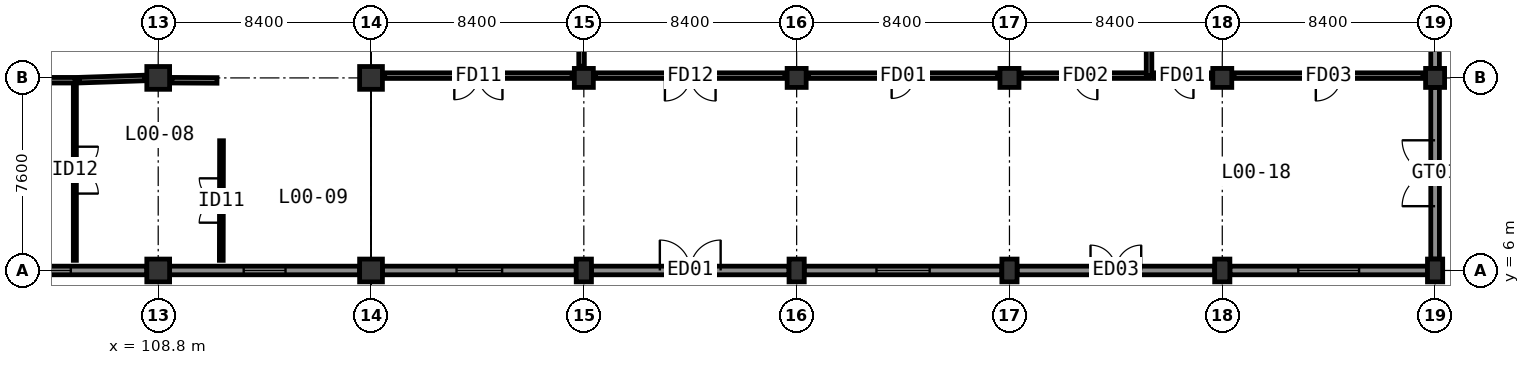
"""IFC4 building model, lengths in metres.
Left out: names, types, materials, properties, quantities, classifications, styles, units other than length and angle.
Written with IfcOpenShell. Run it as: python <this file> out.ifc"""

import sys

from ifc_helpers import new_model, si_unit, direction, frame, frame_2d, origin, origin_2d, place, context, subcontext, project, spatial, rectangle, extrude, element, fill, save


model = new_model("IFC4")
c1 = context("Model", 3, precision=1e-05, world=origin(), true_north=direction((0.0, 1.0)))
c2 = subcontext(c1, "Body", "Model", "MODEL_VIEW")
j1 = project(units=[si_unit("LENGTHUNIT", "METRE"), si_unit("PLANEANGLEUNIT", "RADIAN")], contexts=[c1])
p1 = place(None, origin())
s1 = spatial("IfcSite", under=j1, at=p1, CompositionType="ELEMENT")
p2 = place(p1, origin())
s2 = spatial("IfcBuilding", under=s1, at=p2, CompositionType="ELEMENT")
p3 = place(p2, origin())
s3 = spatial("IfcBuildingStorey", under=s2, at=p3, CompositionType="ELEMENT", Elevation=0.0)
for number, where, z_axis, x_axis in (
    (1, (108.8, 6.0, 0.0), (0.0, 0.0, 1.0), (1.0, 0.0, 0.0)),
    (2, (117.2, 6.0, 0.0), (0.0, 0.0, 1.0), (1.0, 0.0, 0.0)),
):
    element("IfcColumn", number, at=place(p3, frame(where, z_axis=z_axis, x_axis=x_axis)), inside=s3, PredefinedType="COLUMN", context=c2, shape_type="SweptSolid", body=[
        extrude(rectangle(XDim=0.9, YDim=0.9, at=origin_2d()), origin(), (0.0, 0.0, 1.0), 4.8),
    ])
for number, where, z_axis, x_axis in (
    (3, (125.6, 6.0, 0.0), (0.0, 0.0, 1.0), (1.0, 0.0, 0.0)),
    (4, (134.0, 6.0, 0.0), (0.0, 0.0, 1.0), (1.0, 0.0, 0.0)),
    (5, (142.4, 6.0, 0.0), (0.0, 0.0, 1.0), (1.0, 0.0, 0.0)),
    (6, (150.8, 6.0, 0.0), (0.0, 0.0, 1.0), (1.0, 0.0, 0.0)),
    (7, (159.2, 6.0, 0.0), (0.0, 0.0, 1.0), (1.0, 0.0, 0.0)),
):
    element("IfcColumn", number, at=place(p3, frame(where, z_axis=z_axis, x_axis=x_axis)), inside=s3, PredefinedType="PILASTER", context=c2, shape_type="SweptSolid", body=[
        extrude(rectangle(XDim=0.6, YDim=0.9, at=origin_2d()), origin(), (0.0, 0.0, 1.0), 4.8),
    ])
for number, where, z_axis, x_axis in (
    (8, (108.8, 13.6, 0.0), (0.0, 0.0, 1.0), (1.0, 0.0, 0.0)),
    (9, (117.2, 13.6, 0.0), (0.0, 0.0, 1.0), (1.0, 0.0, 0.0)),
):
    element("IfcColumn", number, at=place(p3, frame(where, z_axis=z_axis, x_axis=x_axis)), inside=s3, PredefinedType="COLUMN", context=c2, shape_type="SweptSolid", body=[
        extrude(rectangle(XDim=0.9, YDim=0.9, at=origin_2d()), origin(), (0.0, 0.0, 1.0), 4.8),
    ])
for number, where, z_axis, x_axis in (
    (10, (125.6, 13.6, 0.0), (0.0, 0.0, 1.0), (1.0, 0.0, 0.0)),
    (11, (134.0, 13.6, 0.0), (0.0, 0.0, 1.0), (1.0, 0.0, 0.0)),
    (12, (142.4, 13.6, 0.0), (0.0, 0.0, 1.0), (1.0, 0.0, 0.0)),
    (13, (150.8, 13.6, 0.0), (0.0, 0.0, 1.0), (1.0, 0.0, 0.0)),
    (14, (159.2, 13.6, 0.0), (0.0, 0.0, 1.0), (1.0, 0.0, 0.0)),
):
    element("IfcColumn", number, at=place(p3, frame(where, z_axis=z_axis, x_axis=x_axis)), inside=s3, PredefinedType="COLUMN", context=c2, shape_type="SweptSolid", body=[
        extrude(rectangle(XDim=0.75, YDim=0.75, at=origin_2d()), origin(), (0.0, 0.0, 1.0), 4.8),
    ])
p4 = place(p3, frame((100.85, 6.0, 0.0), z_axis=(0.0, 0.0, 1.0), x_axis=(1.0, 0.0, 0.0)))
e15 = element("IfcWall", 15, at=p4, inside=s3, PredefinedType="SOLIDWALL", context=c2, shape_type="SweptSolid", body=[
    extrude(rectangle(XDim=7.5, YDim=0.34, at=frame_2d((3.75, 0.0))), origin(), (0.0, 0.0, 1.0), 4.047),
])
p5 = place(p4, frame((3.0, 0.0, 0.95)))
e16 = element("IfcOpeningElement", 16, at=p5, cuts=e15, PredefinedType="OPENING", context=c2, shape_type="SweptSolid", body=[
    extrude(rectangle(XDim=1.5, YDim=1.5, at=frame_2d((0.75, 0.75))), frame((0.0, 0.18, 0.0), z_axis=(0.0, -1.0, 0.0), x_axis=(1.0, 0.0, 0.0)), (0.0, 0.0, 1.0), 0.36),
])
p6 = place(p3, frame((109.25, 6.0, 0.0), z_axis=(0.0, 0.0, 1.0), x_axis=(1.0, 0.0, 0.0)))
e17 = element("IfcWall", 17, at=p6, inside=s3, PredefinedType="SOLIDWALL", context=c2, shape_type="SweptSolid", body=[
    extrude(rectangle(XDim=7.5, YDim=0.34, at=frame_2d((3.75, 0.0))), origin(), (0.0, 0.0, 1.0), 4.047),
])
p7 = place(p6, frame((2.925, 0.0, 0.95)))
e18 = element("IfcOpeningElement", 18, at=p7, cuts=e17, PredefinedType="OPENING", context=c2, shape_type="SweptSolid", body=[
    extrude(rectangle(XDim=1.65, YDim=1.5, at=frame_2d((0.825, 0.75))), frame((0.0, 0.18, 0.0), z_axis=(0.0, -1.0, 0.0), x_axis=(1.0, 0.0, 0.0)), (0.0, 0.0, 1.0), 0.36),
])
p8 = place(p3, frame((117.65, 6.0, 0.0), z_axis=(0.0, 0.0, 1.0), x_axis=(1.0, 0.0, 0.0)))
e19 = element("IfcWall", 19, at=p8, inside=s3, PredefinedType="SOLIDWALL", context=c2, shape_type="SweptSolid", body=[
    extrude(rectangle(XDim=7.65, YDim=0.34, at=frame_2d((3.825, 0.0))), origin(), (0.0, 0.0, 1.0), 4.047),
])
p9 = place(p8, frame((2.925, 0.0, 0.95)))
e20 = element("IfcOpeningElement", 20, at=p9, cuts=e19, PredefinedType="OPENING", context=c2, shape_type="SweptSolid", body=[
    extrude(rectangle(XDim=1.8, YDim=1.5, at=frame_2d((0.9, 0.75))), frame((0.0, 0.18, 0.0), z_axis=(0.0, -1.0, 0.0), x_axis=(1.0, 0.0, 0.0)), (0.0, 0.0, 1.0), 0.36),
])
p10 = place(p3, frame((125.9, 6.0, 0.0), z_axis=(0.0, 0.0, 1.0), x_axis=(1.0, 0.0, 0.0)))
e21 = element("IfcWall", 21, at=p10, inside=s3, PredefinedType="SOLIDWALL", context=c2, shape_type="SweptSolid", body=[
    extrude(rectangle(XDim=7.8, YDim=0.34, at=frame_2d((3.9, 0.0))), origin(), (0.0, 0.0, 1.0), 4.187),
])
p11 = place(p10, frame((2.7, 0.0, 0.0)))
e22 = element("IfcOpeningElement", 22, at=p11, cuts=e21, PredefinedType="OPENING", context=c2, shape_type="SweptSolid", body=[
    extrude(rectangle(XDim=2.4, YDim=2.4, at=frame_2d((1.2, 1.2))), frame((0.0, 0.18, 0.0), z_axis=(0.0, -1.0, 0.0), x_axis=(1.0, 0.0, 0.0)), (0.0, 0.0, 1.0), 0.36),
])
p12 = place(p3, frame((134.3, 6.0, 0.0), z_axis=(0.0, 0.0, 1.0), x_axis=(1.0, 0.0, 0.0)))
e23 = element("IfcWall", 23, at=p12, inside=s3, PredefinedType="SOLIDWALL", context=c2, shape_type="SweptSolid", body=[
    extrude(rectangle(XDim=7.8, YDim=0.34, at=frame_2d((3.9, 0.0))), origin(), (0.0, 0.0, 1.0), 4.187),
])
p13 = place(p12, frame((2.85, 0.0, 0.95)))
e24 = element("IfcOpeningElement", 24, at=p13, cuts=e23, PredefinedType="OPENING", context=c2, shape_type="SweptSolid", body=[
    extrude(rectangle(XDim=2.1, YDim=1.5, at=frame_2d((1.05, 0.75))), frame((0.0, 0.18, 0.0), z_axis=(0.0, -1.0, 0.0), x_axis=(1.0, 0.0, 0.0)), (0.0, 0.0, 1.0), 0.36),
])
p14 = place(p3, frame((142.7, 6.0, 0.0), z_axis=(0.0, 0.0, 1.0), x_axis=(1.0, 0.0, 0.0)))
e25 = element("IfcWall", 25, at=p14, inside=s3, PredefinedType="SOLIDWALL", context=c2, shape_type="SweptSolid", body=[
    extrude(rectangle(XDim=7.8, YDim=0.34, at=frame_2d((3.9, 0.0))), origin(), (0.0, 0.0, 1.0), 4.187),
])
p15 = place(p14, frame((2.9, 0.0, 0.0)))
e26 = element("IfcOpeningElement", 26, at=p15, cuts=e25, PredefinedType="OPENING", context=c2, shape_type="SweptSolid", body=[
    extrude(rectangle(XDim=2.0, YDim=2.2, at=frame_2d((1.0, 1.1))), frame((0.0, 0.18, 0.0), z_axis=(0.0, -1.0, 0.0), x_axis=(1.0, 0.0, 0.0)), (0.0, 0.0, 1.0), 0.36),
])
p16 = place(p3, frame((151.1, 6.0, 0.0), z_axis=(0.0, 0.0, 1.0), x_axis=(1.0, 0.0, 0.0)))
e27 = element("IfcWall", 27, at=p16, inside=s3, PredefinedType="SOLIDWALL", context=c2, shape_type="SweptSolid", body=[
    extrude(rectangle(XDim=7.8, YDim=0.34, at=frame_2d((3.9, 0.0))), origin(), (0.0, 0.0, 1.0), 4.187),
])
p17 = place(p16, frame((2.7, 0.0, 0.95)))
e28 = element("IfcOpeningElement", 28, at=p17, cuts=e27, PredefinedType="OPENING", context=c2, shape_type="SweptSolid", body=[
    extrude(rectangle(XDim=2.4, YDim=1.5, at=frame_2d((1.2, 0.75))), frame((0.0, 0.18, 0.0), z_axis=(0.0, -1.0, 0.0), x_axis=(1.0, 0.0, 0.0)), (0.0, 0.0, 1.0), 0.36),
])
p18 = place(p3, frame((159.2, 6.45, 0.0), z_axis=(0.0, 0.0, 1.0), x_axis=(0.0, 1.0, 0.0)))
e29 = element("IfcWall", 29, at=p18, inside=s3, PredefinedType="SOLIDWALL", context=c2, shape_type="SweptSolid", body=[
    extrude(rectangle(XDim=6.775, YDim=0.34, at=frame_2d((3.388, 0.0))), origin(), (0.0, 0.0, 1.0), 4.237),
])
p19 = place(p18, frame((2.087, 0.0, 0.0)))
e30 = element("IfcOpeningElement", 30, at=p19, cuts=e29, PredefinedType="OPENING", context=c2, shape_type="SweptSolid", body=[
    extrude(rectangle(XDim=2.6, YDim=2.2, at=frame_2d((1.3, 1.1))), frame((0.0, 0.18, 0.0), z_axis=(0.0, -1.0, 0.0), x_axis=(1.0, 0.0, 0.0)), (0.0, 0.0, 1.0), 0.36),
])
p20 = place(p3, frame((159.2, 13.975, 0.0), z_axis=(0.0, 0.0, 1.0), x_axis=(0.0, 1.0, 0.0)))
e31 = element("IfcWall", 31, at=p20, inside=s3, PredefinedType="SOLIDWALL", context=c2, shape_type="SweptSolid", body=[
    extrude(rectangle(XDim=6.85, YDim=0.34, at=frame_2d((3.425, 0.0))), origin(), (0.0, 0.0, 1.0), 4.237),
])
p21 = place(p3, frame((125.51, 20.735, 0.0), z_axis=(0.0, 0.0, 1.0), x_axis=(0.0, -1.0, 0.0)))
e32 = element("IfcWall", 32, at=p21, inside=s3, PredefinedType="SOLIDWALL", context=c2, shape_type="SweptSolid", body=[
    extrude(rectangle(XDim=6.67, YDim=0.22, at=frame_2d((3.335, 0.0))), origin(), (0.0, 0.0, 1.0), 3.95),
])
p22 = place(p21, frame((2.86, 0.0, 0.0)))
e33 = element("IfcOpeningElement", 33, at=p22, cuts=e32, PredefinedType="OPENING", context=c2, shape_type="SweptSolid", body=[
    extrude(rectangle(XDim=0.95, YDim=2.1, at=frame_2d((0.475, 1.05))), frame((0.0, 0.12, 0.0), z_axis=(0.0, -1.0, 0.0), x_axis=(1.0, 0.0, 0.0)), (0.0, 0.0, 1.0), 0.24),
])
p23 = place(p3, frame((133.535, 13.69, 0.0), z_axis=(0.0, 0.0, 1.0), x_axis=(-1.0, 0.0, 0.0)))
e34 = element("IfcWall", 34, at=p23, inside=s3, PredefinedType="SOLIDWALL", context=c2, shape_type="SweptSolid", body=[
    extrude(rectangle(XDim=7.47, YDim=0.22, at=frame_2d((3.735, 0.0))), origin(), (0.0, 0.0, 1.0), 4.187),
])
p24 = place(p23, frame((2.735, 0.0, 0.0)))
e35 = element("IfcOpeningElement", 35, at=p24, cuts=e34, PredefinedType="OPENING", context=c2, shape_type="SweptSolid", body=[
    extrude(rectangle(XDim=2.0, YDim=2.25, at=frame_2d((1.0, 1.125))), frame((0.0, 0.12, 0.0), z_axis=(0.0, -1.0, 0.0), x_axis=(1.0, 0.0, 0.0)), (0.0, 0.0, 1.0), 0.24),
])
p25 = place(p3, frame((141.935, 13.69, 0.0), z_axis=(0.0, 0.0, 1.0), x_axis=(-1.0, 0.0, 0.0)))
e36 = element("IfcWall", 36, at=p25, inside=s3, PredefinedType="SOLIDWALL", context=c2, shape_type="SweptSolid", body=[
    extrude(rectangle(XDim=7.47, YDim=0.22, at=frame_2d((3.735, 0.0))), origin(), (0.0, 0.0, 1.0), 4.187),
])
p26 = place(p25, frame((3.285, 0.0, 0.0)))
e37 = element("IfcOpeningElement", 37, at=p26, cuts=e36, PredefinedType="OPENING", context=c2, shape_type="SweptSolid", body=[
    extrude(rectangle(XDim=0.9, YDim=2.1, at=frame_2d((0.45, 1.05))), frame((0.0, 0.12, 0.0), z_axis=(0.0, -1.0, 0.0), x_axis=(1.0, 0.0, 0.0)), (0.0, 0.0, 1.0), 0.24),
])
p27 = place(p3, frame((147.92, 13.691, 0.0), z_axis=(0.0, 0.0, 1.0), x_axis=(-0.999999970842, -0.000241487556, 0.0)))
e38 = element("IfcWall", 38, at=p27, inside=s3, PredefinedType="SOLIDWALL", context=c2, shape_type="SweptSolid", body=[
    extrude(rectangle(XDim=5.055, YDim=0.22, at=frame_2d((2.527, 0.0))), origin(), (0.0, 0.0, 1.0), 4.187),
])
p28 = place(p27, frame((2.052, 0.0, 0.0)))
e39 = element("IfcOpeningElement", 39, at=p28, cuts=e38, PredefinedType="OPENING", context=c2, shape_type="SweptSolid", body=[
    extrude(rectangle(XDim=0.95, YDim=2.1, at=frame_2d((0.475, 1.05))), frame((0.0, 0.12, 0.0), z_axis=(0.0, -1.0, 0.0), x_axis=(1.0, 0.0, 0.0)), (0.0, 0.0, 1.0), 0.24),
])
p29 = place(p3, frame((158.72, 13.69, 0.0), z_axis=(0.0, 0.0, 1.0), x_axis=(-1.0, 0.0, 0.0)))
e40 = element("IfcWall", 40, at=p29, inside=s3, PredefinedType="SOLIDWALL", context=c2, shape_type="SweptSolid", body=[
    extrude(rectangle(XDim=7.455, YDim=0.22, at=frame_2d((3.728, 0.0))), origin(), (0.0, 0.0, 1.0), 3.95),
])
p30 = place(p29, frame((3.228, 0.0, 0.0)))
e41 = element("IfcOpeningElement", 41, at=p30, cuts=e40, PredefinedType="OPENING", context=c2, shape_type="SweptSolid", body=[
    extrude(rectangle(XDim=1.0, YDim=2.1, at=frame_2d((0.5, 1.05))), frame((0.0, 0.12, 0.0), z_axis=(0.0, -1.0, 0.0), x_axis=(1.0, 0.0, 0.0)), (0.0, 0.0, 1.0), 0.24),
])
p31 = place(p3, frame((150.335, 13.69, 0.0), z_axis=(0.0, 0.0, 1.0), x_axis=(-0.999999852155, 0.00054377371, 0.0)))
e42 = element("IfcWall", 42, at=p31, inside=s3, PredefinedType="SOLIDWALL", context=c2, shape_type="SweptSolid", body=[
    extrude(rectangle(XDim=2.245, YDim=0.22, at=frame_2d((1.123, 0.0))), origin(), (0.0, 0.0, 1.0), 4.187),
])
p32 = place(p31, frame((0.673, 0.0, 0.0)))
e43 = element("IfcOpeningElement", 43, at=p32, cuts=e42, PredefinedType="OPENING", context=c2, shape_type="SweptSolid", body=[
    extrude(rectangle(XDim=0.9, YDim=2.1, at=frame_2d((0.45, 1.05))), frame((0.0, 0.12, 0.0), z_axis=(0.0, -1.0, 0.0), x_axis=(1.0, 0.0, 0.0)), (0.0, 0.0, 1.0), 0.24),
])
p33 = place(p3, frame((125.135, 13.69, 0.0), z_axis=(0.0, 0.0, 1.0), x_axis=(-1.0, 0.0, 0.0)))
e44 = element("IfcWall", 44, at=p33, inside=s3, PredefinedType="SOLIDWALL", context=c2, shape_type="SweptSolid", body=[
    extrude(rectangle(XDim=7.395, YDim=0.22, at=frame_2d((3.698, 0.0))), origin(), (0.0, 0.0, 1.0), 3.81),
])
p34 = place(p33, frame((2.748, 0.0, 0.0)))
e45 = element("IfcOpeningElement", 45, at=p34, cuts=e44, PredefinedType="OPENING", context=c2, shape_type="SweptSolid", body=[
    extrude(rectangle(XDim=1.9, YDim=2.2, at=frame_2d((0.95, 1.1))), frame((0.0, 0.12, 0.0), z_axis=(0.0, -1.0, 0.0), x_axis=(1.0, 0.0, 0.0)), (0.0, 0.0, 1.0), 0.24),
])
p35 = place(p3, frame((111.29, 6.4, 0.0), z_axis=(0.0, 0.0, 1.0), x_axis=(0.001965445671, 0.99999806851, 0.0)))
e46 = element("IfcWall", 46, at=p35, inside=s3, PredefinedType="PARTITIONING", context=c2, shape_type="SweptSolid", body=[
    extrude(rectangle(XDim=4.72, YDim=0.15, at=frame_2d((2.36, 0.0))), origin(), (0.0, 0.0, 1.0), 4.5),
])
p36 = place(p35, frame((1.485, 0.0, 0.0)))
e47 = element("IfcOpeningElement", 47, at=p36, cuts=e46, PredefinedType="OPENING", context=c2, shape_type="SweptSolid", body=[
    extrude(rectangle(XDim=1.75, YDim=2.22, at=frame_2d((0.875, 1.11))), frame((0.0, 0.085, 0.0), z_axis=(0.0, -1.0, 0.0), x_axis=(1.0, 0.0, 0.0)), (0.0, 0.0, 1.0), 0.17),
])
p37 = place(p3, frame((105.51, 13.52, 0.0), z_axis=(0.0, 0.0, 1.0), x_axis=(0.0, -1.0, 0.0)))
e48 = element("IfcWall", 48, at=p37, inside=s3, PredefinedType="PARTITIONING", context=c2, shape_type="SweptSolid", body=[
    extrude(rectangle(XDim=7.12, YDim=0.12, at=frame_2d((3.56, 0.0))), origin(), (0.0, 0.0, 1.0), 4.5),
])
p38 = place(p37, frame((2.635, 0.0, 0.0)))
e49 = element("IfcOpeningElement", 49, at=p38, cuts=e48, PredefinedType="OPENING", context=c2, shape_type="SweptSolid", body=[
    extrude(rectangle(XDim=1.85, YDim=2.22, at=frame_2d((0.925, 1.11))), frame((0.0, 0.07, 0.0), z_axis=(0.0, -1.0, 0.0), x_axis=(1.0, 0.0, 0.0)), (0.0, 0.0, 1.0), 0.14),
])
p39 = place(p3, frame((100.94, 13.51, 0.0), z_axis=(0.0, 0.0, 1.0), x_axis=(0.999999964482, -0.000266524511, 0.0)))
e50 = element("IfcWall", 50, at=p39, inside=s3, PredefinedType="SOLIDWALL", context=c2, shape_type="SweptSolid", body=[
    extrude(rectangle(XDim=4.58, YDim=0.22, at=frame_2d((2.29, 0.0))), origin(), (0.0, 0.0, 1.0), 3.81),
])
p40 = place(p3, frame((105.69, 13.511, 0.0), z_axis=(0.0, 0.0, 1.0), x_axis=(0.999441424237, 0.033419148982, 0.0)))
e51 = element("IfcWall", 51, at=p40, inside=s3, PredefinedType="SOLIDWALL", context=c2, shape_type="SweptSolid", body=[
    extrude(rectangle(XDim=2.572, YDim=0.22, at=frame_2d((1.286, 0.0))), origin(), (0.0, 0.0, 1.0), 3.81),
])
p41 = place(p3, frame((109.34, 13.51, 0.0), z_axis=(0.0, 0.0, 1.0), x_axis=(0.999988478092, -0.004800383587, 0.0)))
e52 = element("IfcWall", 52, at=p41, inside=s3, PredefinedType="SOLIDWALL", context=c2, shape_type="SweptSolid", body=[
    extrude(rectangle(XDim=1.78, YDim=0.22, at=frame_2d((0.89, 0.0))), origin(), (0.0, 0.0, 1.0), 3.81),
])
p42 = place(p3, frame((147.901, 21.92, 0.0), z_axis=(0.0, 0.0, 1.0), x_axis=(0.001125891853, -0.999999366184, 0.0)))
e53 = element("IfcWall", 53, at=p42, inside=s3, PredefinedType="SOLIDWALL", context=c2, shape_type="SweptSolid", body=[
    extrude(rectangle(XDim=8.24, YDim=0.22, at=frame_2d((4.12, 0.0))), origin(), (0.0, 0.0, 1.0), 4.5),
])
p43 = place(p5, origin())
e54 = element("IfcWindow", 54, at=p43, inside=s3, PartitioningType="SINGLE_PANEL", PredefinedType="WINDOW", context=c2, shape_type="SweptSolid", body=[
    extrude(rectangle(XDim=1.5, YDim=1.5, at=frame_2d((0.75, 0.75))), frame((0.0, 0.03, 0.0), z_axis=(0.0, -1.0, 0.0), x_axis=(1.0, 0.0, 0.0)), (0.0, 0.0, 1.0), 0.06),
])
fill(e16, e54)
p44 = place(p7, origin())
e55 = element("IfcWindow", 55, at=p44, inside=s3, PartitioningType="SINGLE_PANEL", PredefinedType="WINDOW", context=c2, shape_type="SweptSolid", body=[
    extrude(rectangle(XDim=1.65, YDim=1.5, at=frame_2d((0.825, 0.75))), frame((0.0, 0.03, 0.0), z_axis=(0.0, -1.0, 0.0), x_axis=(1.0, 0.0, 0.0)), (0.0, 0.0, 1.0), 0.06),
])
fill(e18, e55)
p45 = place(p9, origin())
e56 = element("IfcWindow", 56, at=p45, inside=s3, PartitioningType="DOUBLE_PANEL_VERTICAL", PredefinedType="WINDOW", context=c2, shape_type="SweptSolid", body=[
    extrude(rectangle(XDim=1.8, YDim=1.5, at=frame_2d((0.9, 0.75))), frame((0.0, 0.03, 0.0), z_axis=(0.0, -1.0, 0.0), x_axis=(1.0, 0.0, 0.0)), (0.0, 0.0, 1.0), 0.06),
])
fill(e20, e56)
p46 = place(p11, frame((2.4, 0.0, 0.0), z_axis=(0.0, 0.0, 1.0), x_axis=(-1.0, 0.0, 0.0)))
e57 = element("IfcDoor", 57, at=p46, inside=s3, OperationType="DOUBLE_DOOR_SINGLE_SWING", PredefinedType="DOOR", context=c2, shape_type="SweptSolid", body=[
    extrude(rectangle(XDim=2.4, YDim=2.4, at=frame_2d((1.2, 1.2))), frame((0.0, 0.025, 0.0), z_axis=(0.0, -1.0, 0.0), x_axis=(1.0, 0.0, 0.0)), (0.0, 0.0, 1.0), 0.05),
])
fill(e22, e57)
p47 = place(p13, origin())
e58 = element("IfcWindow", 58, at=p47, inside=s3, PartitioningType="DOUBLE_PANEL_VERTICAL", PredefinedType="WINDOW", context=c2, shape_type="SweptSolid", body=[
    extrude(rectangle(XDim=2.1, YDim=1.5, at=frame_2d((1.05, 0.75))), frame((0.0, 0.03, 0.0), z_axis=(0.0, -1.0, 0.0), x_axis=(1.0, 0.0, 0.0)), (0.0, 0.0, 1.0), 0.06),
])
fill(e24, e58)
p48 = place(p15, frame((2.0, 0.0, 0.0), z_axis=(0.0, 0.0, 1.0), x_axis=(-1.0, 0.0, 0.0)))
e59 = element("IfcDoor", 59, at=p48, inside=s3, OperationType="DOUBLE_DOOR_SINGLE_SWING", PredefinedType="DOOR", context=c2, shape_type="SweptSolid", body=[
    extrude(rectangle(XDim=2.0, YDim=2.2, at=frame_2d((1.0, 1.1))), frame((0.0, 0.025, 0.0), z_axis=(0.0, -1.0, 0.0), x_axis=(1.0, 0.0, 0.0)), (0.0, 0.0, 1.0), 0.05),
])
fill(e26, e59)
p49 = place(p17, origin())
e60 = element("IfcWindow", 60, at=p49, inside=s3, PartitioningType="DOUBLE_PANEL_VERTICAL", PredefinedType="WINDOW", context=c2, shape_type="SweptSolid", body=[
    extrude(rectangle(XDim=2.4, YDim=1.5, at=frame_2d((1.2, 0.75))), frame((0.0, 0.03, 0.0), z_axis=(0.0, -1.0, 0.0), x_axis=(1.0, 0.0, 0.0)), (0.0, 0.0, 1.0), 0.06),
])
fill(e28, e60)
p50 = place(p19, frame((2.6, 0.0, 0.0), z_axis=(0.0, 0.0, 1.0), x_axis=(-1.0, 0.0, 0.0)))
e61 = element("IfcDoor", 61, at=p50, inside=s3, OperationType="DOUBLE_DOOR_SINGLE_SWING", PredefinedType="GATE", context=c2, shape_type="SweptSolid", body=[
    extrude(rectangle(XDim=2.6, YDim=2.2, at=frame_2d((1.3, 1.1))), frame((0.0, 0.025, 0.0), z_axis=(0.0, -1.0, 0.0), x_axis=(1.0, 0.0, 0.0)), (0.0, 0.0, 1.0), 0.05),
])
fill(e30, e61)
p51 = place(p24, origin())
e62 = element("IfcDoor", 62, at=p51, inside=s3, OperationType="DOUBLE_DOOR_SINGLE_SWING", PredefinedType="DOOR", context=c2, shape_type="SweptSolid", body=[
    extrude(rectangle(XDim=2.0, YDim=2.25, at=frame_2d((1.0, 1.125))), frame((0.0, 0.025, 0.0), z_axis=(0.0, -1.0, 0.0), x_axis=(1.0, 0.0, 0.0)), (0.0, 0.0, 1.0), 0.05),
])
fill(e35, e62)
p52 = place(p26, origin())
e63 = element("IfcDoor", 63, at=p52, inside=s3, OperationType="SINGLE_SWING_RIGHT", PredefinedType="DOOR", context=c2, shape_type="SweptSolid", body=[
    extrude(rectangle(XDim=0.9, YDim=2.1, at=frame_2d((0.45, 1.05))), frame((0.0, 0.025, 0.0), z_axis=(0.0, -1.0, 0.0), x_axis=(1.0, 0.0, 0.0)), (0.0, 0.0, 1.0), 0.05),
])
fill(e37, e63)
p53 = place(p28, origin())
e64 = element("IfcDoor", 64, at=p53, inside=s3, OperationType="SINGLE_SWING_LEFT", PredefinedType="DOOR", context=c2, shape_type="SweptSolid", body=[
    extrude(rectangle(XDim=0.95, YDim=2.1, at=frame_2d((0.475, 1.05))), frame((0.0, 0.025, 0.0), z_axis=(0.0, -1.0, 0.0), x_axis=(1.0, 0.0, 0.0)), (0.0, 0.0, 1.0), 0.05),
])
fill(e39, e64)
p54 = place(p30, origin())
e65 = element("IfcDoor", 65, at=p54, inside=s3, OperationType="SINGLE_SWING_RIGHT", PredefinedType="DOOR", context=c2, shape_type="SweptSolid", body=[
    extrude(rectangle(XDim=1.0, YDim=2.1, at=frame_2d((0.5, 1.05))), frame((0.0, 0.025, 0.0), z_axis=(0.0, -1.0, 0.0), x_axis=(1.0, 0.0, 0.0)), (0.0, 0.0, 1.0), 0.05),
])
fill(e41, e65)
p55 = place(p32, origin())
e66 = element("IfcDoor", 66, at=p55, inside=s3, OperationType="SINGLE_SWING_LEFT", PredefinedType="DOOR", context=c2, shape_type="SweptSolid", body=[
    extrude(rectangle(XDim=0.9, YDim=2.1, at=frame_2d((0.45, 1.05))), frame((0.0, 0.025, 0.0), z_axis=(0.0, -1.0, 0.0), x_axis=(1.0, 0.0, 0.0)), (0.0, 0.0, 1.0), 0.05),
])
fill(e43, e66)
p56 = place(p34, origin())
e67 = element("IfcDoor", 67, at=p56, inside=s3, OperationType="DOUBLE_DOOR_SINGLE_SWING", PredefinedType="DOOR", context=c2, shape_type="SweptSolid", body=[
    extrude(rectangle(XDim=1.9, YDim=2.2, at=frame_2d((0.95, 1.1))), frame((0.0, 0.025, 0.0), z_axis=(0.0, -1.0, 0.0), x_axis=(1.0, 0.0, 0.0)), (0.0, 0.0, 1.0), 0.05),
])
fill(e45, e67)
p57 = place(p36, origin())
e68 = element("IfcDoor", 68, at=p57, inside=s3, OperationType="DOUBLE_DOOR_SINGLE_SWING", PredefinedType="DOOR", context=c2, shape_type="SweptSolid", body=[
    extrude(rectangle(XDim=1.75, YDim=2.22, at=frame_2d((0.875, 1.11))), frame((0.0, 0.025, 0.0), z_axis=(0.0, -1.0, 0.0), x_axis=(1.0, 0.0, 0.0)), (0.0, 0.0, 1.0), 0.05),
])
fill(e47, e68)
p58 = place(p38, origin())
e69 = element("IfcDoor", 69, at=p58, inside=s3, OperationType="DOUBLE_DOOR_SINGLE_SWING", PredefinedType="DOOR", context=c2, shape_type="SweptSolid", body=[
    extrude(rectangle(XDim=1.85, YDim=2.22, at=frame_2d((0.925, 1.11))), frame((0.0, 0.025, 0.0), z_axis=(0.0, -1.0, 0.0), x_axis=(1.0, 0.0, 0.0)), (0.0, 0.0, 1.0), 0.05),
])
fill(e49, e69)
save(model, sys.argv[1])
